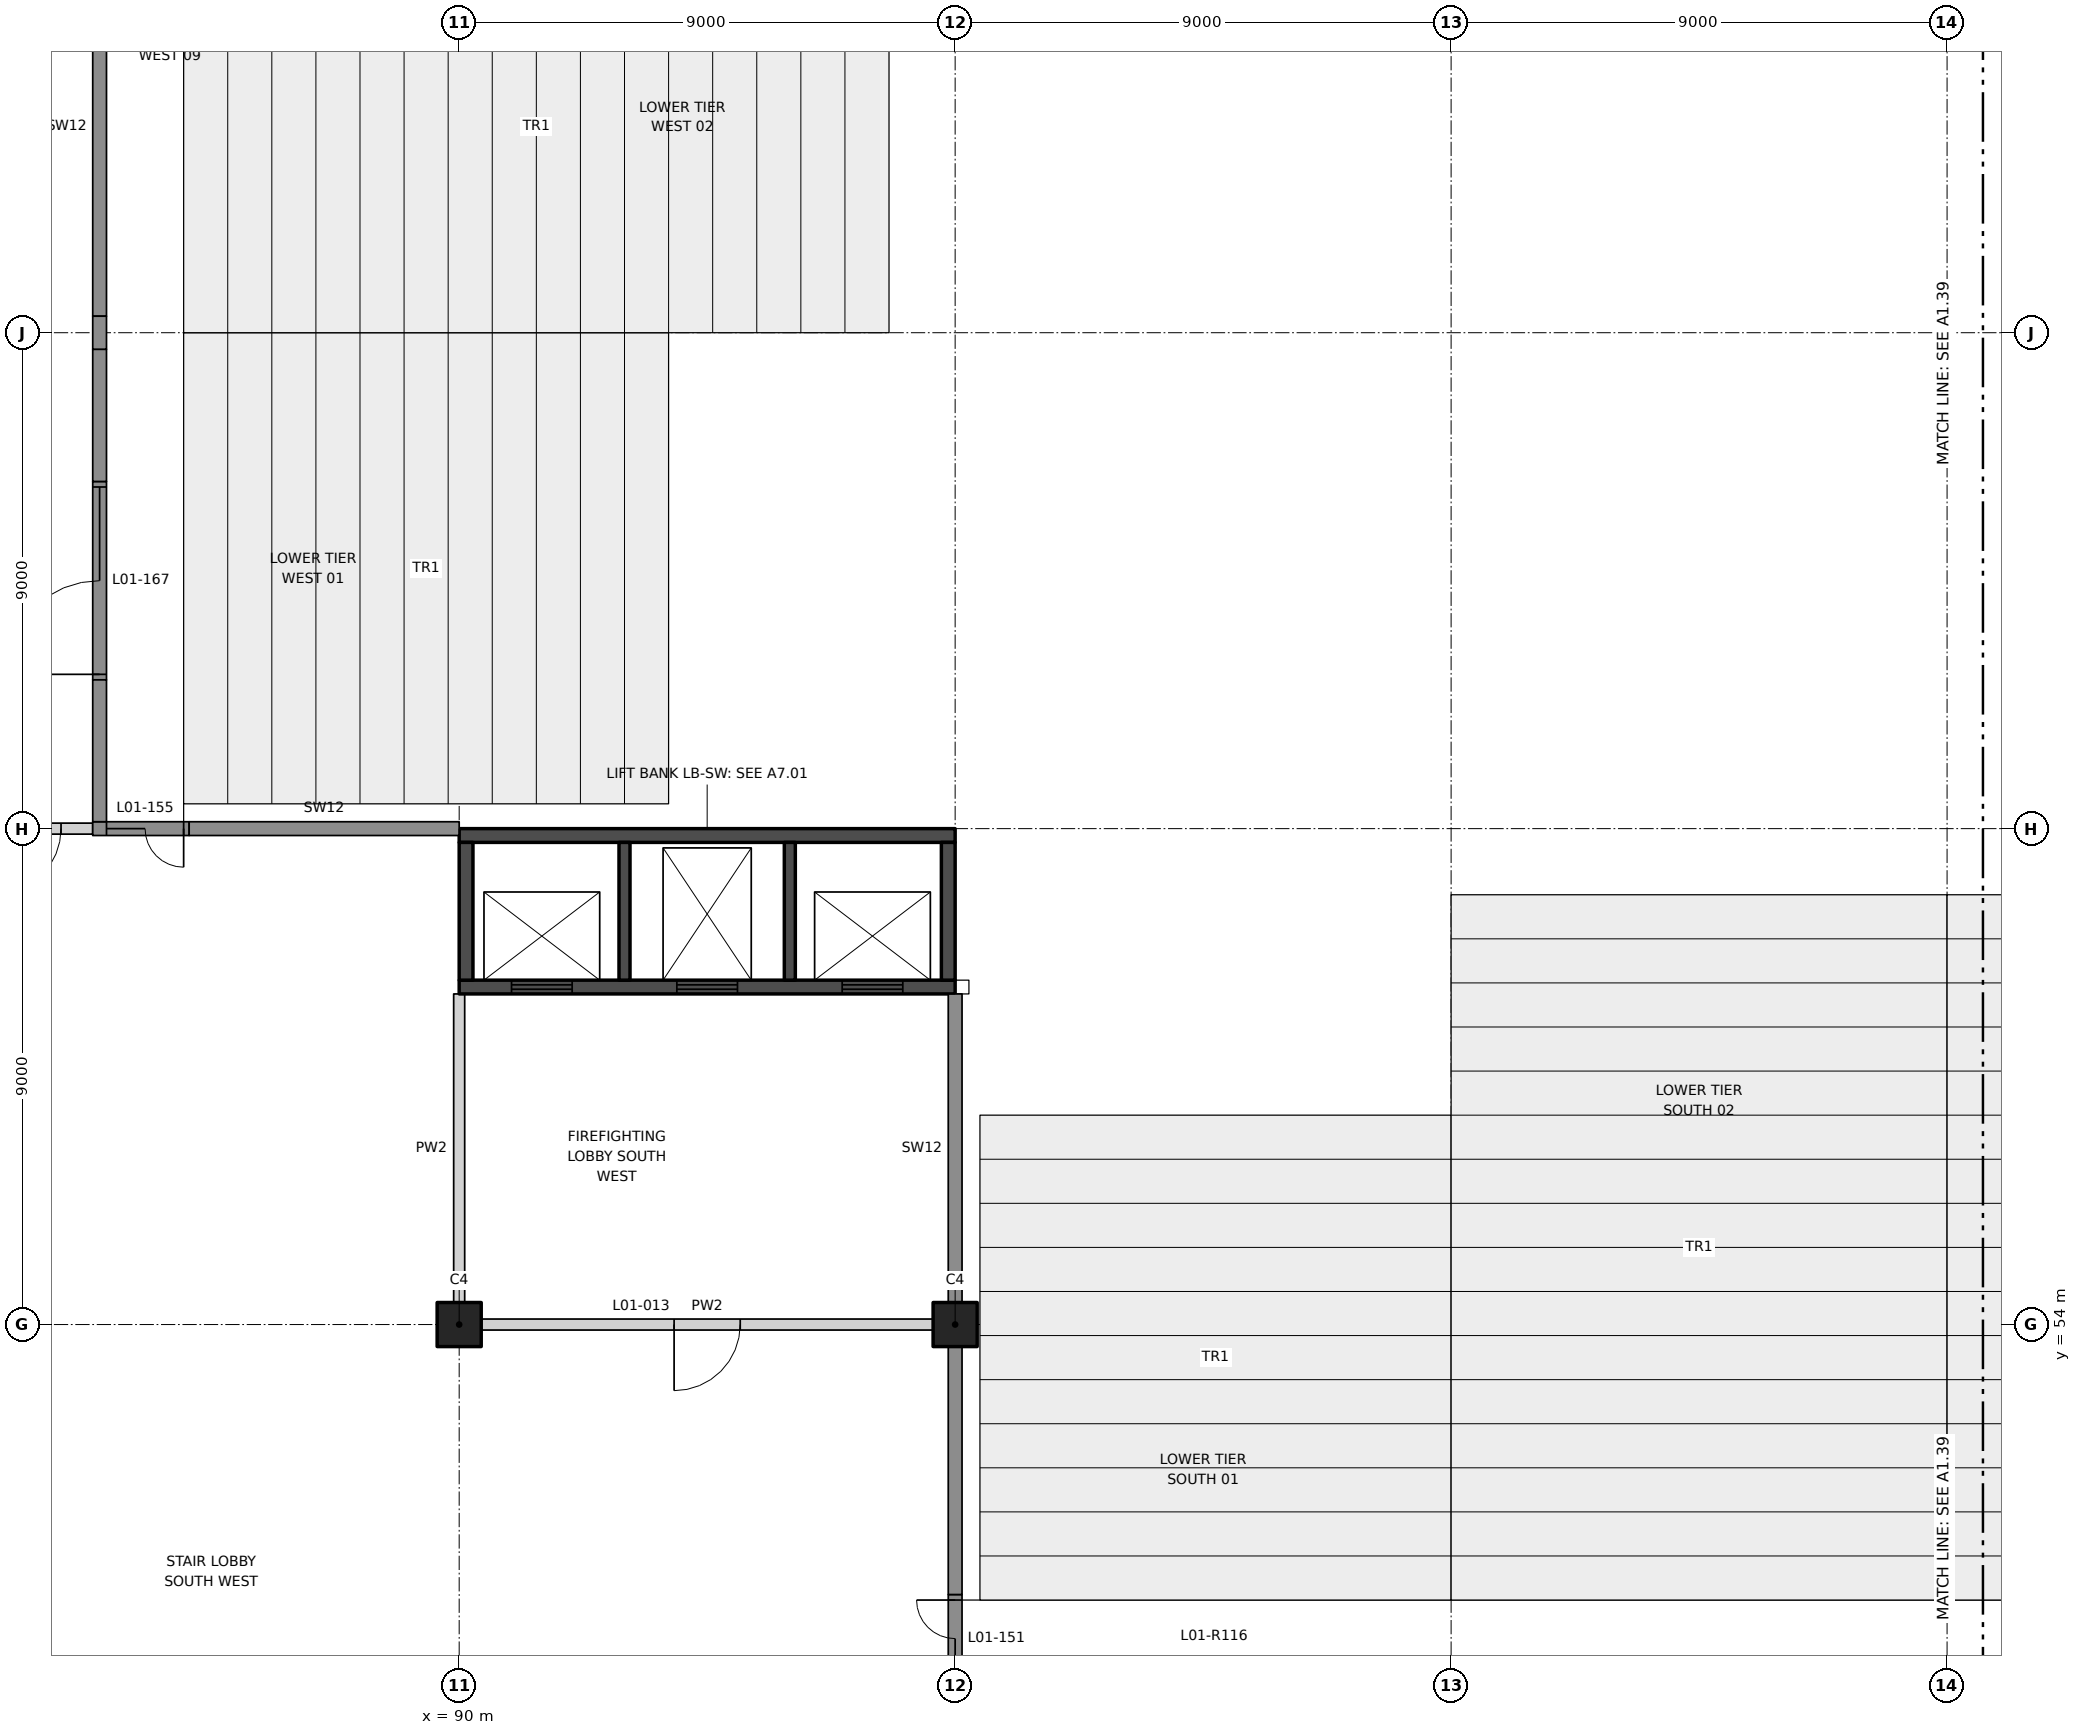
"""IFC4 building model, lengths in metres.
Left out: names, types, materials, properties, quantities, classifications, styles, units other than length and angle.
Written with IfcOpenShell. Run it as: python <this file> out.ifc"""

import sys

from ifc_helpers import new_model, si_unit, direction, frame, frame_2d, origin, origin_2d, place, context, subcontext, project, spatial, rectangle, extrude, element, fill, save


model = new_model("IFC4")
c1 = context("Model", 3, precision=1e-05, world=origin(), true_north=direction((0.0, 1.0)))
c2 = subcontext(c1, "Body", "Model", "MODEL_VIEW")
j1 = project(units=[si_unit("LENGTHUNIT", "METRE"), si_unit("PLANEANGLEUNIT", "RADIAN")], contexts=[c1])
p1 = place(None, origin())
s1 = spatial("IfcSite", under=j1, at=p1, CompositionType="ELEMENT")
p2 = place(p1, origin())
s2 = spatial("IfcBuilding", under=s1, at=p2, CompositionType="ELEMENT")
p3 = place(p2, frame((0.0, 0.0, 7.0)))
s3 = spatial("IfcBuildingStorey", under=s2, at=p3, CompositionType="ELEMENT", Elevation=7.0)
for number, where, z_axis, x_axis in (
    (1, (90.0, 54.0, 0.0), (0.0, 0.0, 1.0), (1.0, 0.0, 0.0)),
    (2, (99.0, 54.0, 0.0), (0.0, 0.0, 1.0), (1.0, 0.0, 0.0)),
):
    element("IfcColumn", number, at=place(p3, frame(where, z_axis=z_axis, x_axis=x_axis)), inside=s3, PredefinedType="COLUMN", context=c2, shape_type="SweptSolid", body=[
        extrude(rectangle(XDim=0.8, YDim=0.8, at=origin_2d()), origin(), (0.0, 0.0, 1.0), 4.5),
    ])
p4 = place(p3, frame((90.4, 54.0, 0.0), z_axis=(0.0, 0.0, 1.0), x_axis=(1.0, 0.0, 0.0)))
e3 = element("IfcWall", 3, at=p4, inside=s3, PredefinedType="PARTITIONING", context=c2, shape_type="SweptSolid", body=[
    extrude(rectangle(XDim=8.2, YDim=0.2, at=frame_2d((4.1, 0.0))), origin(), (0.0, 0.0, 1.0), 3.25),
])
p5 = place(p4, frame((3.5, 0.0, 0.0)))
e4 = element("IfcOpeningElement", 4, at=p5, cuts=e3, PredefinedType="OPENING", context=c2, shape_type="SweptSolid", body=[
    extrude(rectangle(XDim=1.2, YDim=2.1, at=frame_2d((0.6, 1.05))), frame((0.0, 0.11, 0.0), z_axis=(0.0, -1.0, 0.0), x_axis=(1.0, 0.0, 0.0)), (0.0, 0.0, 1.0), 0.22),
])
p6 = place(p3, frame((81.0, 63.0, 0.0), z_axis=(0.0, 0.0, 1.0), x_axis=(1.0, 0.0, 0.0)))
e5 = element("IfcWall", 5, at=p6, inside=s3, PredefinedType="PARTITIONING", context=c2, shape_type="SweptSolid", body=[
    extrude(rectangle(XDim=2.35, YDim=0.2, at=frame_2d((1.175, 0.0))), origin(), (0.0, 0.0, 1.0), 3.15),
])
p7 = place(p6, frame((0.575, 0.0, 0.0)))
e6 = element("IfcOpeningElement", 6, at=p7, cuts=e5, PredefinedType="OPENING", context=c2, shape_type="SweptSolid", body=[
    extrude(rectangle(XDim=1.2, YDim=2.1, at=frame_2d((0.6, 1.05))), frame((0.0, 0.11, 0.0), z_axis=(0.0, -1.0, 0.0), x_axis=(1.0, 0.0, 0.0)), (0.0, 0.0, 1.0), 0.22),
])
p8 = place(p3, frame((90.0, 54.4, 0.0), z_axis=(0.0, 0.0, 1.0), x_axis=(0.0, 1.0, 0.0)))
e7 = element("IfcWall", 7, at=p8, inside=s3, PredefinedType="PARTITIONING", context=c2, shape_type="SweptSolid", body=[
    extrude(rectangle(XDim=5.6, YDim=0.2, at=frame_2d((2.8, 0.0))), origin(), (0.0, 0.0, 1.0), 3.45),
])
p9 = place(p3, frame((90.0, 60.125, 0.0), z_axis=(0.0, 0.0, 1.0), x_axis=(1.0, 0.0, 0.0)))
e8 = element("IfcWall", 8, at=p9, inside=s3, PredefinedType="SHEAR", context=c2, shape_type="SweptSolid", body=[
    extrude(rectangle(XDim=9.0, YDim=0.25, at=frame_2d((4.5, 0.0))), origin(), (0.0, 0.0, 1.0), 4.5),
])
p10 = place(p9, frame((0.95, 0.0, 0.0)))
e9 = element("IfcOpeningElement", 9, at=p10, cuts=e8, PredefinedType="OPENING", context=c2, shape_type="SweptSolid", body=[
    extrude(rectangle(XDim=1.1, YDim=2.1, at=frame_2d((0.55, 1.05))), frame((0.0, 0.135, 0.0), z_axis=(0.0, -1.0, 0.0), x_axis=(1.0, 0.0, 0.0)), (0.0, 0.0, 1.0), 0.27),
])
p11 = place(p9, frame((3.95, 0.0, 0.0)))
e10 = element("IfcOpeningElement", 10, at=p11, cuts=e8, PredefinedType="OPENING", context=c2, shape_type="SweptSolid", body=[
    extrude(rectangle(XDim=1.1, YDim=2.1, at=frame_2d((0.55, 1.05))), frame((0.0, 0.135, 0.0), z_axis=(0.0, -1.0, 0.0), x_axis=(1.0, 0.0, 0.0)), (0.0, 0.0, 1.0), 0.27),
])
p12 = place(p9, frame((6.95, 0.0, 0.0)))
e11 = element("IfcOpeningElement", 11, at=p12, cuts=e8, PredefinedType="OPENING", context=c2, shape_type="SweptSolid", body=[
    extrude(rectangle(XDim=1.1, YDim=2.1, at=frame_2d((0.55, 1.05))), frame((0.0, 0.135, 0.0), z_axis=(0.0, -1.0, 0.0), x_axis=(1.0, 0.0, 0.0)), (0.0, 0.0, 1.0), 0.27),
])
p13 = place(p3, frame((90.0, 62.875, 0.0), z_axis=(0.0, 0.0, 1.0), x_axis=(1.0, 0.0, 0.0)))
e12 = element("IfcWall", 12, at=p13, inside=s3, PredefinedType="SHEAR", context=c2, shape_type="SweptSolid", body=[
    extrude(rectangle(XDim=9.0, YDim=0.25, at=frame_2d((4.5, 0.0))), origin(), (0.0, 0.0, 1.0), 4.5),
])
for number, where, z_axis, x_axis in (
    (13, (90.125, 60.25, 0.0), (0.0, 0.0, 1.0), (0.0, 1.0, 0.0)),
    (14, (98.875, 60.25, 0.0), (0.0, 0.0, 1.0), (0.0, 1.0, 0.0)),
):
    element("IfcWall", number, at=place(p3, frame(where, z_axis=z_axis, x_axis=x_axis)), inside=s3, PredefinedType="SHEAR", context=c2, shape_type="SweptSolid", body=[
        extrude(rectangle(XDim=2.5, YDim=0.25, at=frame_2d((1.25, 0.0))), origin(), (0.0, 0.0, 1.0), 4.5),
    ])
for number, where, z_axis, x_axis in (
    (15, (93.0, 60.25, 0.0), (0.0, 0.0, 1.0), (0.0, 1.0, 0.0)),
    (16, (96.0, 60.25, 0.0), (0.0, 0.0, 1.0), (0.0, 1.0, 0.0)),
):
    element("IfcWall", number, at=place(p3, frame(where, z_axis=z_axis, x_axis=x_axis)), inside=s3, PredefinedType="SHEAR", context=c2, shape_type="SweptSolid", body=[
        extrude(rectangle(XDim=2.5, YDim=0.2, at=frame_2d((1.25, 0.0))), origin(), (0.0, 0.0, 1.0), 4.5),
    ])
p14 = place(p3, frame((99.0, 49.1, 0.0), z_axis=(0.0, 0.0, 1.0), x_axis=(0.0, -1.0, 0.0)))
e17 = element("IfcWall", 17, at=p14, inside=s3, PredefinedType="SOLIDWALL", context=c2, shape_type="SweptSolid", body=[
    extrude(rectangle(XDim=1.75, YDim=0.25, at=frame_2d((0.875, 0.0))), origin(), (0.0, 0.0, 1.0), 3.15),
])
p15 = place(p14, frame((0.1, 0.0, 0.0)))
e18 = element("IfcOpeningElement", 18, at=p15, cuts=e17, PredefinedType="OPENING", context=c2, shape_type="SweptSolid", body=[
    extrude(rectangle(XDim=1.4, YDim=2.4, at=frame_2d((0.7, 1.2))), frame((0.0, 0.135, 0.0), z_axis=(0.0, -1.0, 0.0), x_axis=(1.0, 0.0, 0.0)), (0.0, 0.0, 1.0), 0.27),
])
p16 = place(p3, frame((85.1, 63.0, 0.0), z_axis=(0.0, 0.0, 1.0), x_axis=(-1.0, 0.0, 0.0)))
e19 = element("IfcWall", 19, at=p16, inside=s3, PredefinedType="SOLIDWALL", context=c2, shape_type="SweptSolid", body=[
    extrude(rectangle(XDim=1.75, YDim=0.25, at=frame_2d((0.875, 0.0))), origin(), (0.0, 0.0, 1.0), 3.15),
])
p17 = place(p16, frame((0.1, 0.0, 0.0)))
e20 = element("IfcOpeningElement", 20, at=p17, cuts=e19, PredefinedType="OPENING", context=c2, shape_type="SweptSolid", body=[
    extrude(rectangle(XDim=1.4, YDim=2.4, at=frame_2d((0.7, 1.2))), frame((0.0, 0.135, 0.0), z_axis=(0.0, -1.0, 0.0), x_axis=(1.0, 0.0, 0.0)), (0.0, 0.0, 1.0), 0.27),
])
p18 = place(p3, frame((99.0, 49.1, 0.0), z_axis=(0.0, 0.0, 1.0), x_axis=(0.0, 1.0, 0.0)))
e21 = element("IfcWall", 21, at=p18, inside=s3, PredefinedType="SOLIDWALL", context=c2, shape_type="SweptSolid", body=[
    extrude(rectangle(XDim=4.5, YDim=0.25, at=frame_2d((2.25, 0.0))), origin(), (0.0, 0.0, 1.0), 3.15),
])
p19 = place(p3, frame((99.0, 54.4, 0.0), z_axis=(0.0, 0.0, 1.0), x_axis=(0.0, 1.0, 0.0)))
e22 = element("IfcWall", 22, at=p19, inside=s3, PredefinedType="SOLIDWALL", context=c2, shape_type="SweptSolid", body=[
    extrude(rectangle(XDim=5.6, YDim=0.25, at=frame_2d((2.8, 0.0))), origin(), (0.0, 0.0, 1.0), 3.45),
])
p20 = place(p3, frame((85.1, 63.0, 0.0), z_axis=(0.0, 0.0, 1.0), x_axis=(1.0, 0.0, 0.0)))
e23 = element("IfcWall", 23, at=p20, inside=s3, PredefinedType="SOLIDWALL", context=c2, shape_type="SweptSolid", body=[
    extrude(rectangle(XDim=4.9, YDim=0.25, at=frame_2d((2.45, 0.0))), origin(), (0.0, 0.0, 1.0), 3.15),
])
p21 = place(p3, frame((83.475, 65.7, 0.0), z_axis=(0.0, 0.0, 1.0), x_axis=(0.0, 1.0, 0.0)))
e24 = element("IfcWall", 24, at=p21, inside=s3, PredefinedType="SOLIDWALL", context=c2, shape_type="SweptSolid", body=[
    extrude(rectangle(XDim=3.6, YDim=0.25, at=frame_2d((1.8, 0.0))), origin(), (0.0, 0.0, 1.0), 3.15),
])
p22 = place(p21, frame((0.1, 0.0, 0.0)))
e25 = element("IfcOpeningElement", 25, at=p22, cuts=e24, PredefinedType="OPENING", context=c2, shape_type="SweptSolid", body=[
    extrude(rectangle(XDim=3.4, YDim=2.4, at=frame_2d((1.7, 1.2))), frame((0.0, 0.135, 0.0), z_axis=(0.0, -1.0, 0.0), x_axis=(1.0, 0.0, 0.0)), (0.0, 0.0, 1.0), 0.27),
])
p23 = place(p3, frame((83.475, 63.125, 0.0), z_axis=(0.0, 0.0, 1.0), x_axis=(0.0, 1.0, 0.0)))
e26 = element("IfcWall", 26, at=p23, inside=s3, PredefinedType="SOLIDWALL", context=c2, shape_type="SweptSolid", body=[
    extrude(rectangle(XDim=2.575, YDim=0.25, at=frame_2d((1.288, 0.0))), origin(), (0.0, 0.0, 1.0), 3.15),
])
p24 = place(p3, frame((83.475, 72.3, 0.0), z_axis=(0.0, 0.0, 1.0), x_axis=(0.0, 1.0, 0.0)))
e27 = element("IfcWall", 27, at=p24, inside=s3, PredefinedType="SOLIDWALL", context=c2, shape_type="SweptSolid", body=[
    extrude(rectangle(XDim=6.9, YDim=0.25, at=frame_2d((3.45, 0.0))), origin(), (0.0, 0.0, 1.0), 3.15),
])
p25 = place(p3, frame((83.475, 69.3, 0.0), z_axis=(0.0, 0.0, 1.0), x_axis=(0.0, 1.0, 0.0)))
e28 = element("IfcWall", 28, at=p25, inside=s3, PredefinedType="SOLIDWALL", context=c2, shape_type="SweptSolid", body=[
    extrude(rectangle(XDim=2.4, YDim=0.25, at=frame_2d((1.2, 0.0))), origin(), (0.0, 0.0, 1.0), 3.15),
])
p26 = place(p3, frame((83.475, 71.7, 0.0), z_axis=(0.0, 0.0, 1.0), x_axis=(0.0, 1.0, 0.0)))
e29 = element("IfcWall", 29, at=p26, inside=s3, PredefinedType="SOLIDWALL", context=c2, shape_type="SweptSolid", body=[
    extrude(rectangle(XDim=0.6, YDim=0.25, at=frame_2d((0.3, 0.0))), origin(), (0.0, 0.0, 1.0), 4.15),
])
p27 = place(p5, frame((1.2, 0.0, 0.0), z_axis=(0.0, 0.0, 1.0), x_axis=(-1.0, 0.0, 0.0)))
e30 = element("IfcDoor", 30, at=p27, inside=s3, OperationType="SINGLE_SWING_RIGHT", PredefinedType="DOOR", context=c2, shape_type="SweptSolid", body=[
    extrude(rectangle(XDim=1.2, YDim=2.1, at=frame_2d((0.6, 1.05))), frame((0.0, 0.025, 0.0), z_axis=(0.0, -1.0, 0.0), x_axis=(1.0, 0.0, 0.0)), (0.0, 0.0, 1.0), 0.05),
])
fill(e4, e30)
p28 = place(p7, frame((1.2, 0.0, 0.0), z_axis=(0.0, 0.0, 1.0), x_axis=(-1.0, 0.0, 0.0)))
e31 = element("IfcDoor", 31, at=p28, inside=s3, OperationType="SINGLE_SWING_RIGHT", PredefinedType="DOOR", context=c2, shape_type="SweptSolid", body=[
    extrude(rectangle(XDim=1.2, YDim=2.1, at=frame_2d((0.6, 1.05))), frame((0.0, 0.025, 0.0), z_axis=(0.0, -1.0, 0.0), x_axis=(1.0, 0.0, 0.0)), (0.0, 0.0, 1.0), 0.05),
])
fill(e6, e31)
p29 = place(p10, origin())
e32 = element("IfcDoor", 32, at=p29, inside=s3, OperationType="DOUBLE_DOOR_SLIDING", PredefinedType="DOOR", context=c2, shape_type="SweptSolid", body=[
    extrude(rectangle(XDim=1.1, YDim=2.1, at=frame_2d((0.55, 1.05))), frame((0.0, 0.025, 0.0), z_axis=(0.0, -1.0, 0.0), x_axis=(1.0, 0.0, 0.0)), (0.0, 0.0, 1.0), 0.05),
])
fill(e9, e32)
p30 = place(p11, origin())
e33 = element("IfcDoor", 33, at=p30, inside=s3, OperationType="DOUBLE_DOOR_SLIDING", PredefinedType="DOOR", context=c2, shape_type="SweptSolid", body=[
    extrude(rectangle(XDim=1.1, YDim=2.1, at=frame_2d((0.55, 1.05))), frame((0.0, 0.025, 0.0), z_axis=(0.0, -1.0, 0.0), x_axis=(1.0, 0.0, 0.0)), (0.0, 0.0, 1.0), 0.05),
])
fill(e10, e33)
p31 = place(p12, origin())
e34 = element("IfcDoor", 34, at=p31, inside=s3, OperationType="DOUBLE_DOOR_SLIDING", PredefinedType="DOOR", context=c2, shape_type="SweptSolid", body=[
    extrude(rectangle(XDim=1.1, YDim=2.1, at=frame_2d((0.55, 1.05))), frame((0.0, 0.025, 0.0), z_axis=(0.0, -1.0, 0.0), x_axis=(1.0, 0.0, 0.0)), (0.0, 0.0, 1.0), 0.05),
])
fill(e11, e34)
p32 = place(p15, frame((1.4, 0.0, 0.0), z_axis=(0.0, 0.0, 1.0), x_axis=(-1.0, 0.0, 0.0)))
e35 = element("IfcDoor", 35, at=p32, inside=s3, OperationType="DOUBLE_DOOR_SINGLE_SWING", PredefinedType="DOOR", context=c2, shape_type="SweptSolid", body=[
    extrude(rectangle(XDim=1.4, YDim=2.4, at=frame_2d((0.7, 1.2))), frame((0.0, 0.025, 0.0), z_axis=(0.0, -1.0, 0.0), x_axis=(1.0, 0.0, 0.0)), (0.0, 0.0, 1.0), 0.05),
])
fill(e18, e35)
p33 = place(p17, origin())
e36 = element("IfcDoor", 36, at=p33, inside=s3, OperationType="DOUBLE_DOOR_SINGLE_SWING", PredefinedType="DOOR", context=c2, shape_type="SweptSolid", body=[
    extrude(rectangle(XDim=1.4, YDim=2.4, at=frame_2d((0.7, 1.2))), frame((0.0, 0.025, 0.0), z_axis=(0.0, -1.0, 0.0), x_axis=(1.0, 0.0, 0.0)), (0.0, 0.0, 1.0), 0.05),
])
fill(e20, e36)
p34 = place(p22, origin())
e37 = element("IfcDoor", 37, at=p34, inside=s3, OperationType="DOUBLE_DOOR_SINGLE_SWING", PredefinedType="DOOR", context=c2, shape_type="SweptSolid", body=[
    extrude(rectangle(XDim=3.4, YDim=2.4, at=frame_2d((1.7, 1.2))), frame((0.0, 0.025, 0.0), z_axis=(0.0, -1.0, 0.0), x_axis=(1.0, 0.0, 0.0)), (0.0, 0.0, 1.0), 0.05),
])
fill(e25, e37)
save(model, sys.argv[1])
